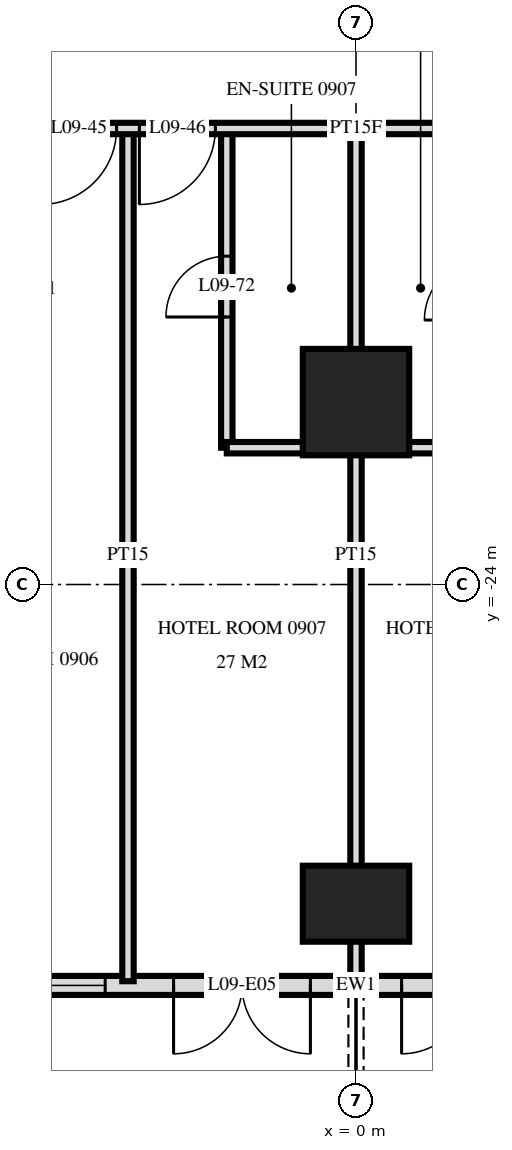
"""IFC4 building model, lengths in metres.
Left out: names, types, materials, properties, quantities, classifications, styles, units other than length and angle.
Written with IfcOpenShell. Run it as: python <this file> out.ifc"""

import sys

from ifc_helpers import new_model, si_unit, direction, frame, frame_2d, origin, origin_2d, place, context, subcontext, project, spatial, rectangle, extrude, element, fill, save


model = new_model("IFC4")
c1 = context("Model", 3, precision=1e-05, world=origin(), true_north=direction((0.0, 1.0)))
c2 = subcontext(c1, "Body", "Model", "MODEL_VIEW")
j1 = project(units=[si_unit("LENGTHUNIT", "METRE"), si_unit("PLANEANGLEUNIT", "RADIAN")], contexts=[c1])
p1 = place(None, origin())
s1 = spatial("IfcSite", under=j1, at=p1, CompositionType="ELEMENT")
p2 = place(p1, origin())
s2 = spatial("IfcBuilding", under=s1, at=p2, CompositionType="ELEMENT")
p3 = place(p2, frame((0.0, 0.0, 42.0)))
s3 = spatial("IfcBuildingStorey", under=s2, at=p3, CompositionType="ELEMENT", Elevation=42.0)
p4 = place(p3, frame((0.0, -28.2, 0.0), z_axis=(0.0, 0.0, 1.0), x_axis=(1.0, 0.0, 0.0)))
e1 = element("IfcColumn", 1, at=p4, inside=s3, PredefinedType="COLUMN", context=c2, shape_type="SweptSolid", body=[
    extrude(rectangle(XDim=1.4, YDim=1.0, at=origin_2d()), origin(), (0.0, 0.0, 1.0), 3.6),
])
p5 = place(p3, frame((0.0, -21.6, 0.0), z_axis=(0.0, 0.0, 1.0), x_axis=(1.0, 0.0, 0.0)))
e2 = element("IfcColumn", 2, at=p5, inside=s3, PredefinedType="COLUMN", context=c2, shape_type="SweptSolid", body=[
    extrude(rectangle(XDim=1.4, YDim=1.4, at=origin_2d()), origin(), (0.0, 0.0, 1.0), 3.6),
])
p6 = place(p3, frame((-28.775, -29.275, 0.0), z_axis=(0.0, 0.0, 1.0), x_axis=(1.0, 0.0, 0.0)))
e3 = element("IfcWall", 3, at=p6, inside=s3, PredefinedType="SOLIDWALL", context=c2, shape_type="SweptSolid", body=[
    extrude(rectangle(XDim=57.551, YDim=0.25, at=frame_2d((28.775, 0.0))), origin(), (0.0, 0.0, 1.0), 3.32),
])
p7 = place(p6, frame((0.575, 0.0, 0.0)))
e4 = element("IfcOpeningElement", 4, at=p7, cuts=e3, PredefinedType="OPENING", context=c2, shape_type="SweptSolid", body=[
    extrude(rectangle(XDim=1.8, YDim=2.4, at=frame_2d((0.9, 1.2))), frame((0.0, 0.135, 0.0), z_axis=(0.0, -1.0, 0.0), x_axis=(1.0, 0.0, 0.0)), (0.0, 0.0, 1.0), 0.27),
])
p8 = place(p6, frame((5.375, 0.0, 0.0)))
e5 = element("IfcOpeningElement", 5, at=p8, cuts=e3, PredefinedType="OPENING", context=c2, shape_type="SweptSolid", body=[
    extrude(rectangle(XDim=1.8, YDim=2.4, at=frame_2d((0.9, 1.2))), frame((0.0, 0.135, 0.0), z_axis=(0.0, -1.0, 0.0), x_axis=(1.0, 0.0, 0.0)), (0.0, 0.0, 1.0), 0.27),
])
p9 = place(p6, frame((8.075, 0.0, 0.3)))
e6 = element("IfcOpeningElement", 6, at=p9, cuts=e3, PredefinedType="OPENING", context=c2, shape_type="SweptSolid", body=[
    extrude(rectangle(XDim=2.4, YDim=2.1, at=frame_2d((1.2, 1.05))), frame((0.0, 0.135, 0.0), z_axis=(0.0, -1.0, 0.0), x_axis=(1.0, 0.0, 0.0)), (0.0, 0.0, 1.0), 0.27),
])
p10 = place(p6, frame((11.375, 0.0, 0.0)))
e7 = element("IfcOpeningElement", 7, at=p10, cuts=e3, PredefinedType="OPENING", context=c2, shape_type="SweptSolid", body=[
    extrude(rectangle(XDim=1.8, YDim=2.4, at=frame_2d((0.9, 1.2))), frame((0.0, 0.135, 0.0), z_axis=(0.0, -1.0, 0.0), x_axis=(1.0, 0.0, 0.0)), (0.0, 0.0, 1.0), 0.27),
])
p11 = place(p6, frame((14.075, 0.0, 0.3)))
e8 = element("IfcOpeningElement", 8, at=p11, cuts=e3, PredefinedType="OPENING", context=c2, shape_type="SweptSolid", body=[
    extrude(rectangle(XDim=2.4, YDim=2.1, at=frame_2d((1.2, 1.05))), frame((0.0, 0.135, 0.0), z_axis=(0.0, -1.0, 0.0), x_axis=(1.0, 0.0, 0.0)), (0.0, 0.0, 1.0), 0.27),
])
p12 = place(p6, frame((17.375, 0.0, 0.0)))
e9 = element("IfcOpeningElement", 9, at=p12, cuts=e3, PredefinedType="OPENING", context=c2, shape_type="SweptSolid", body=[
    extrude(rectangle(XDim=1.8, YDim=2.4, at=frame_2d((0.9, 1.2))), frame((0.0, 0.135, 0.0), z_axis=(0.0, -1.0, 0.0), x_axis=(1.0, 0.0, 0.0)), (0.0, 0.0, 1.0), 0.27),
])
p13 = place(p6, frame((20.075, 0.0, 0.3)))
e10 = element("IfcOpeningElement", 10, at=p13, cuts=e3, PredefinedType="OPENING", context=c2, shape_type="SweptSolid", body=[
    extrude(rectangle(XDim=2.4, YDim=2.1, at=frame_2d((1.2, 1.05))), frame((0.0, 0.135, 0.0), z_axis=(0.0, -1.0, 0.0), x_axis=(1.0, 0.0, 0.0)), (0.0, 0.0, 1.0), 0.27),
])
p14 = place(p6, frame((23.075, 0.0, 0.3)))
e11 = element("IfcOpeningElement", 11, at=p14, cuts=e3, PredefinedType="OPENING", context=c2, shape_type="SweptSolid", body=[
    extrude(rectangle(XDim=2.4, YDim=2.1, at=frame_2d((1.2, 1.05))), frame((0.0, 0.135, 0.0), z_axis=(0.0, -1.0, 0.0), x_axis=(1.0, 0.0, 0.0)), (0.0, 0.0, 1.0), 0.27),
])
p15 = place(p6, frame((26.375, 0.0, 0.0)))
e12 = element("IfcOpeningElement", 12, at=p15, cuts=e3, PredefinedType="OPENING", context=c2, shape_type="SweptSolid", body=[
    extrude(rectangle(XDim=1.8, YDim=2.4, at=frame_2d((0.9, 1.2))), frame((0.0, 0.135, 0.0), z_axis=(0.0, -1.0, 0.0), x_axis=(1.0, 0.0, 0.0)), (0.0, 0.0, 1.0), 0.27),
])
p16 = place(p6, frame((29.375, 0.0, 0.0)))
e13 = element("IfcOpeningElement", 13, at=p16, cuts=e3, PredefinedType="OPENING", context=c2, shape_type="SweptSolid", body=[
    extrude(rectangle(XDim=1.8, YDim=2.4, at=frame_2d((0.9, 1.2))), frame((0.0, 0.135, 0.0), z_axis=(0.0, -1.0, 0.0), x_axis=(1.0, 0.0, 0.0)), (0.0, 0.0, 1.0), 0.27),
])
p17 = place(p6, frame((32.075, 0.0, 0.3)))
e14 = element("IfcOpeningElement", 14, at=p17, cuts=e3, PredefinedType="OPENING", context=c2, shape_type="SweptSolid", body=[
    extrude(rectangle(XDim=2.4, YDim=2.1, at=frame_2d((1.2, 1.05))), frame((0.0, 0.135, 0.0), z_axis=(0.0, -1.0, 0.0), x_axis=(1.0, 0.0, 0.0)), (0.0, 0.0, 1.0), 0.27),
])
p18 = place(p6, frame((35.375, 0.0, 0.0)))
e15 = element("IfcOpeningElement", 15, at=p18, cuts=e3, PredefinedType="OPENING", context=c2, shape_type="SweptSolid", body=[
    extrude(rectangle(XDim=1.8, YDim=2.4, at=frame_2d((0.9, 1.2))), frame((0.0, 0.135, 0.0), z_axis=(0.0, -1.0, 0.0), x_axis=(1.0, 0.0, 0.0)), (0.0, 0.0, 1.0), 0.27),
])
p19 = place(p6, frame((38.075, 0.0, 0.3)))
e16 = element("IfcOpeningElement", 16, at=p19, cuts=e3, PredefinedType="OPENING", context=c2, shape_type="SweptSolid", body=[
    extrude(rectangle(XDim=2.4, YDim=2.1, at=frame_2d((1.2, 1.05))), frame((0.0, 0.135, 0.0), z_axis=(0.0, -1.0, 0.0), x_axis=(1.0, 0.0, 0.0)), (0.0, 0.0, 1.0), 0.27),
])
p20 = place(p6, frame((41.375, 0.0, 0.0)))
e17 = element("IfcOpeningElement", 17, at=p20, cuts=e3, PredefinedType="OPENING", context=c2, shape_type="SweptSolid", body=[
    extrude(rectangle(XDim=1.8, YDim=2.4, at=frame_2d((0.9, 1.2))), frame((0.0, 0.135, 0.0), z_axis=(0.0, -1.0, 0.0), x_axis=(1.0, 0.0, 0.0)), (0.0, 0.0, 1.0), 0.27),
])
p21 = place(p6, frame((44.075, 0.0, 0.3)))
e18 = element("IfcOpeningElement", 18, at=p21, cuts=e3, PredefinedType="OPENING", context=c2, shape_type="SweptSolid", body=[
    extrude(rectangle(XDim=2.4, YDim=2.1, at=frame_2d((1.2, 1.05))), frame((0.0, 0.135, 0.0), z_axis=(0.0, -1.0, 0.0), x_axis=(1.0, 0.0, 0.0)), (0.0, 0.0, 1.0), 0.27),
])
p22 = place(p6, frame((47.375, 0.0, 0.0)))
e19 = element("IfcOpeningElement", 19, at=p22, cuts=e3, PredefinedType="OPENING", context=c2, shape_type="SweptSolid", body=[
    extrude(rectangle(XDim=1.8, YDim=2.4, at=frame_2d((0.9, 1.2))), frame((0.0, 0.135, 0.0), z_axis=(0.0, -1.0, 0.0), x_axis=(1.0, 0.0, 0.0)), (0.0, 0.0, 1.0), 0.27),
])
p23 = place(p6, frame((50.075, 0.0, 0.3)))
e20 = element("IfcOpeningElement", 20, at=p23, cuts=e3, PredefinedType="OPENING", context=c2, shape_type="SweptSolid", body=[
    extrude(rectangle(XDim=2.4, YDim=2.1, at=frame_2d((1.2, 1.05))), frame((0.0, 0.135, 0.0), z_axis=(0.0, -1.0, 0.0), x_axis=(1.0, 0.0, 0.0)), (0.0, 0.0, 1.0), 0.27),
])
p24 = place(p6, frame((53.375, 0.0, 0.0)))
e21 = element("IfcOpeningElement", 21, at=p24, cuts=e3, PredefinedType="OPENING", context=c2, shape_type="SweptSolid", body=[
    extrude(rectangle(XDim=1.8, YDim=2.4, at=frame_2d((0.9, 1.2))), frame((0.0, 0.135, 0.0), z_axis=(0.0, -1.0, 0.0), x_axis=(1.0, 0.0, 0.0)), (0.0, 0.0, 1.0), 0.27),
])
p25 = place(p3, frame((0.0, -29.22, 0.0), z_axis=(0.0, 0.0, 1.0), x_axis=(0.0, 1.0, 0.0)))
e22 = element("IfcWall", 22, at=p25, inside=s3, PredefinedType="PARTITIONING", context=c2, shape_type="SweptSolid", body=[
    extrude(rectangle(XDim=11.22, YDim=0.15, at=frame_2d((5.61, 0.0))), origin(), (0.0, 0.0, 1.0), 3.32),
])
p26 = place(p3, frame((-1.7, -22.2, 0.0), z_axis=(0.0, 0.0, 1.0), x_axis=(0.0, 1.0, 0.0)))
e23 = element("IfcWall", 23, at=p26, inside=s3, PredefinedType="PARTITIONING", context=c2, shape_type="SweptSolid", body=[
    extrude(rectangle(XDim=4.2, YDim=0.15, at=frame_2d((2.1, 0.0))), origin(), (0.0, 0.0, 1.0), 3.32),
])
p27 = place(p26, frame((1.72, 0.0, 0.0)))
e24 = element("IfcOpeningElement", 24, at=p27, cuts=e23, PredefinedType="OPENING", context=c2, shape_type="SweptSolid", body=[
    extrude(rectangle(XDim=0.8, YDim=2.1, at=frame_2d((0.4, 1.05))), frame((0.0, 0.085, 0.0), z_axis=(0.0, -1.0, 0.0), x_axis=(1.0, 0.0, 0.0)), (0.0, 0.0, 1.0), 0.17),
])
p28 = place(p3, frame((-3.0, -29.22, 0.0), z_axis=(0.0, 0.0, 1.0), x_axis=(0.0, 1.0, 0.0)))
e25 = element("IfcWall", 25, at=p28, inside=s3, PredefinedType="PARTITIONING", context=c2, shape_type="SweptSolid", body=[
    extrude(rectangle(XDim=11.22, YDim=0.15, at=frame_2d((5.61, 0.0))), origin(), (0.0, 0.0, 1.0), 3.32),
])
p29 = place(p3, frame((-1.7, -22.2, 0.0), z_axis=(0.0, 0.0, 1.0), x_axis=(1.0, 0.0, 0.0)))
e26 = element("IfcWall", 26, at=p29, inside=s3, PredefinedType="PARTITIONING", context=c2, shape_type="SweptSolid", body=[
    extrude(rectangle(XDim=3.4, YDim=0.15, at=frame_2d((1.7, 0.0))), origin(), (0.0, 0.0, 1.0), 3.32),
])
p30 = place(p3, frame((-33.12, -18.0, 0.0), z_axis=(0.0, 0.0, 1.0), x_axis=(1.0, 0.0, 0.0)))
e27 = element("IfcWall", 27, at=p30, inside=s3, PredefinedType="PARTITIONING", context=c2, shape_type="SweptSolid", body=[
    extrude(rectangle(XDim=66.24, YDim=0.15, at=frame_2d((33.12, 0.0))), origin(), (0.0, 0.0, 1.0), 3.32),
])
p31 = place(p30, frame((12.27, 0.0, 0.0)))
e28 = element("IfcOpeningElement", 28, at=p31, cuts=e27, PredefinedType="OPENING", context=c2, shape_type="SweptSolid", body=[
    extrude(rectangle(XDim=1.0, YDim=2.1, at=frame_2d((0.5, 1.05))), frame((0.0, 0.085, 0.0), z_axis=(0.0, -1.0, 0.0), x_axis=(1.0, 0.0, 0.0)), (0.0, 0.0, 1.0), 0.17),
])
p32 = place(p30, frame((16.97, 0.0, 0.0)))
e29 = element("IfcOpeningElement", 29, at=p32, cuts=e27, PredefinedType="OPENING", context=c2, shape_type="SweptSolid", body=[
    extrude(rectangle(XDim=1.0, YDim=2.1, at=frame_2d((0.5, 1.05))), frame((0.0, 0.085, 0.0), z_axis=(0.0, -1.0, 0.0), x_axis=(1.0, 0.0, 0.0)), (0.0, 0.0, 1.0), 0.17),
])
p33 = place(p30, frame((18.27, 0.0, 0.0)))
e30 = element("IfcOpeningElement", 30, at=p33, cuts=e27, PredefinedType="OPENING", context=c2, shape_type="SweptSolid", body=[
    extrude(rectangle(XDim=1.0, YDim=2.1, at=frame_2d((0.5, 1.05))), frame((0.0, 0.085, 0.0), z_axis=(0.0, -1.0, 0.0), x_axis=(1.0, 0.0, 0.0)), (0.0, 0.0, 1.0), 0.17),
])
p34 = place(p30, frame((22.97, 0.0, 0.0)))
e31 = element("IfcOpeningElement", 31, at=p34, cuts=e27, PredefinedType="OPENING", context=c2, shape_type="SweptSolid", body=[
    extrude(rectangle(XDim=1.0, YDim=2.1, at=frame_2d((0.5, 1.05))), frame((0.0, 0.085, 0.0), z_axis=(0.0, -1.0, 0.0), x_axis=(1.0, 0.0, 0.0)), (0.0, 0.0, 1.0), 0.17),
])
p35 = place(p30, frame((24.27, 0.0, 0.0)))
e32 = element("IfcOpeningElement", 32, at=p35, cuts=e27, PredefinedType="OPENING", context=c2, shape_type="SweptSolid", body=[
    extrude(rectangle(XDim=1.0, YDim=2.1, at=frame_2d((0.5, 1.05))), frame((0.0, 0.085, 0.0), z_axis=(0.0, -1.0, 0.0), x_axis=(1.0, 0.0, 0.0)), (0.0, 0.0, 1.0), 0.17),
])
p36 = place(p30, frame((28.97, 0.0, 0.0)))
e33 = element("IfcOpeningElement", 33, at=p36, cuts=e27, PredefinedType="OPENING", context=c2, shape_type="SweptSolid", body=[
    extrude(rectangle(XDim=1.0, YDim=2.1, at=frame_2d((0.5, 1.05))), frame((0.0, 0.085, 0.0), z_axis=(0.0, -1.0, 0.0), x_axis=(1.0, 0.0, 0.0)), (0.0, 0.0, 1.0), 0.17),
])
p37 = place(p30, frame((30.27, 0.0, 0.0)))
e34 = element("IfcOpeningElement", 34, at=p37, cuts=e27, PredefinedType="OPENING", context=c2, shape_type="SweptSolid", body=[
    extrude(rectangle(XDim=1.0, YDim=2.1, at=frame_2d((0.5, 1.05))), frame((0.0, 0.085, 0.0), z_axis=(0.0, -1.0, 0.0), x_axis=(1.0, 0.0, 0.0)), (0.0, 0.0, 1.0), 0.17),
])
p38 = place(p30, frame((34.97, 0.0, 0.0)))
e35 = element("IfcOpeningElement", 35, at=p38, cuts=e27, PredefinedType="OPENING", context=c2, shape_type="SweptSolid", body=[
    extrude(rectangle(XDim=1.0, YDim=2.1, at=frame_2d((0.5, 1.05))), frame((0.0, 0.085, 0.0), z_axis=(0.0, -1.0, 0.0), x_axis=(1.0, 0.0, 0.0)), (0.0, 0.0, 1.0), 0.17),
])
p39 = place(p30, frame((37.27, 0.0, 0.0)))
e36 = element("IfcOpeningElement", 36, at=p39, cuts=e27, PredefinedType="OPENING", context=c2, shape_type="SweptSolid", body=[
    extrude(rectangle(XDim=1.0, YDim=2.1, at=frame_2d((0.5, 1.05))), frame((0.0, 0.085, 0.0), z_axis=(0.0, -1.0, 0.0), x_axis=(1.0, 0.0, 0.0)), (0.0, 0.0, 1.0), 0.17),
])
p40 = place(p30, frame((43.97, 0.0, 0.0)))
e37 = element("IfcOpeningElement", 37, at=p40, cuts=e27, PredefinedType="OPENING", context=c2, shape_type="SweptSolid", body=[
    extrude(rectangle(XDim=1.0, YDim=2.1, at=frame_2d((0.5, 1.05))), frame((0.0, 0.085, 0.0), z_axis=(0.0, -1.0, 0.0), x_axis=(1.0, 0.0, 0.0)), (0.0, 0.0, 1.0), 0.17),
])
p41 = place(p30, frame((45.27, 0.0, 0.0)))
e38 = element("IfcOpeningElement", 38, at=p41, cuts=e27, PredefinedType="OPENING", context=c2, shape_type="SweptSolid", body=[
    extrude(rectangle(XDim=1.0, YDim=2.1, at=frame_2d((0.5, 1.05))), frame((0.0, 0.085, 0.0), z_axis=(0.0, -1.0, 0.0), x_axis=(1.0, 0.0, 0.0)), (0.0, 0.0, 1.0), 0.17),
])
p42 = place(p30, frame((51.22, 0.0, 0.0)))
e39 = element("IfcOpeningElement", 39, at=p42, cuts=e27, PredefinedType="OPENING", context=c2, shape_type="SweptSolid", body=[
    extrude(rectangle(XDim=1.0, YDim=2.1, at=frame_2d((0.5, 1.05))), frame((0.0, 0.085, 0.0), z_axis=(0.0, -1.0, 0.0), x_axis=(1.0, 0.0, 0.0)), (0.0, 0.0, 1.0), 0.17),
])
p43 = place(p30, frame((54.27, 0.0, 0.0)))
e40 = element("IfcOpeningElement", 40, at=p43, cuts=e27, PredefinedType="OPENING", context=c2, shape_type="SweptSolid", body=[
    extrude(rectangle(XDim=1.0, YDim=2.1, at=frame_2d((0.5, 1.05))), frame((0.0, 0.085, 0.0), z_axis=(0.0, -1.0, 0.0), x_axis=(1.0, 0.0, 0.0)), (0.0, 0.0, 1.0), 0.17),
])
p44 = place(p30, frame((6.07, 0.0, 0.0)))
e41 = element("IfcOpeningElement", 41, at=p44, cuts=e27, PredefinedType="OPENING", context=c2, shape_type="SweptSolid", body=[
    extrude(rectangle(XDim=1.0, YDim=2.1, at=frame_2d((0.5, 1.05))), frame((0.0, 0.085, 0.0), z_axis=(0.0, -1.0, 0.0), x_axis=(1.0, 0.0, 0.0)), (0.0, 0.0, 1.0), 0.17),
])
p45 = place(p30, frame((63.37, 0.0, 0.0)))
e42 = element("IfcOpeningElement", 42, at=p45, cuts=e27, PredefinedType="OPENING", context=c2, shape_type="SweptSolid", body=[
    extrude(rectangle(XDim=1.0, YDim=2.1, at=frame_2d((0.5, 1.05))), frame((0.0, 0.085, 0.0), z_axis=(0.0, -1.0, 0.0), x_axis=(1.0, 0.0, 0.0)), (0.0, 0.0, 1.0), 0.17),
])
p46 = place(p14, origin())
e43 = element("IfcWindow", 43, at=p46, inside=s3, PartitioningType="SINGLE_PANEL", PredefinedType="WINDOW", context=c2, shape_type="SweptSolid", body=[
    extrude(rectangle(XDim=2.4, YDim=2.1, at=frame_2d((1.2, 1.05))), frame((0.0, 0.03, 0.0), z_axis=(0.0, -1.0, 0.0), x_axis=(1.0, 0.0, 0.0)), (0.0, 0.0, 1.0), 0.06),
])
fill(e11, e43)
p47 = place(p15, frame((0.9, 0.0, 0.0), z_axis=(0.0, 0.0, 1.0), x_axis=(-1.0, 0.0, 0.0)))
e44 = element("IfcDoor", 44, at=p47, inside=s3, OperationType="DOUBLE_DOOR_SINGLE_SWING", PredefinedType="DOOR", context=c2, shape_type="SweptSolid", body=[
    extrude(rectangle(XDim=1.8, YDim=2.4, at=frame_2d((0.0, 1.2))), frame((0.0, -0.025, 0.0), z_axis=(0.0, 1.0, 0.0), x_axis=(-1.0, 0.0, 0.0)), (0.0, 0.0, 1.0), 0.05),
])
fill(e12, e44)
p48 = place(p16, frame((0.9, 0.0, 0.0), z_axis=(0.0, 0.0, 1.0), x_axis=(-1.0, 0.0, 0.0)))
e45 = element("IfcDoor", 45, at=p48, inside=s3, OperationType="DOUBLE_DOOR_SINGLE_SWING", PredefinedType="DOOR", context=c2, shape_type="SweptSolid", body=[
    extrude(rectangle(XDim=1.8, YDim=2.4, at=frame_2d((0.0, 1.2))), frame((0.0, -0.025, 0.0), z_axis=(0.0, 1.0, 0.0), x_axis=(-1.0, 0.0, 0.0)), (0.0, 0.0, 1.0), 0.05),
])
fill(e13, e45)
p49 = place(p36, frame((0.5, 0.0, 0.0), z_axis=(0.0, 0.0, 1.0), x_axis=(-1.0, 0.0, 0.0)))
e46 = element("IfcDoor", 46, at=p49, inside=s3, OperationType="SINGLE_SWING_LEFT", PredefinedType="DOOR", context=c2, shape_type="SweptSolid", body=[
    extrude(rectangle(XDim=1.0, YDim=2.1, at=frame_2d((0.0, 1.05))), frame((0.0, -0.025, 0.0), z_axis=(0.0, 1.0, 0.0), x_axis=(-1.0, 0.0, 0.0)), (0.0, 0.0, 1.0), 0.05),
])
fill(e33, e46)
p50 = place(p37, frame((0.5, 0.0, 0.0), z_axis=(0.0, 0.0, 1.0), x_axis=(-1.0, 0.0, 0.0)))
e47 = element("IfcDoor", 47, at=p50, inside=s3, OperationType="SINGLE_SWING_LEFT", PredefinedType="DOOR", context=c2, shape_type="SweptSolid", body=[
    extrude(rectangle(XDim=1.0, YDim=2.1, at=frame_2d((0.0, 1.05))), frame((0.0, -0.025, 0.0), z_axis=(0.0, 1.0, 0.0), x_axis=(-1.0, 0.0, 0.0)), (0.0, 0.0, 1.0), 0.05),
])
fill(e34, e47)
p51 = place(p27, origin())
e48 = element("IfcDoor", 48, at=p51, inside=s3, OperationType="SINGLE_SWING_RIGHT", PredefinedType="DOOR", context=c2, shape_type="SweptSolid", body=[
    extrude(rectangle(XDim=0.8, YDim=2.1, at=frame_2d((0.4, 1.05))), frame((0.0, 0.025, 0.0), z_axis=(0.0, -1.0, 0.0), x_axis=(1.0, 0.0, 0.0)), (0.0, 0.0, 1.0), 0.05),
])
fill(e24, e48)
save(model, sys.argv[1])
